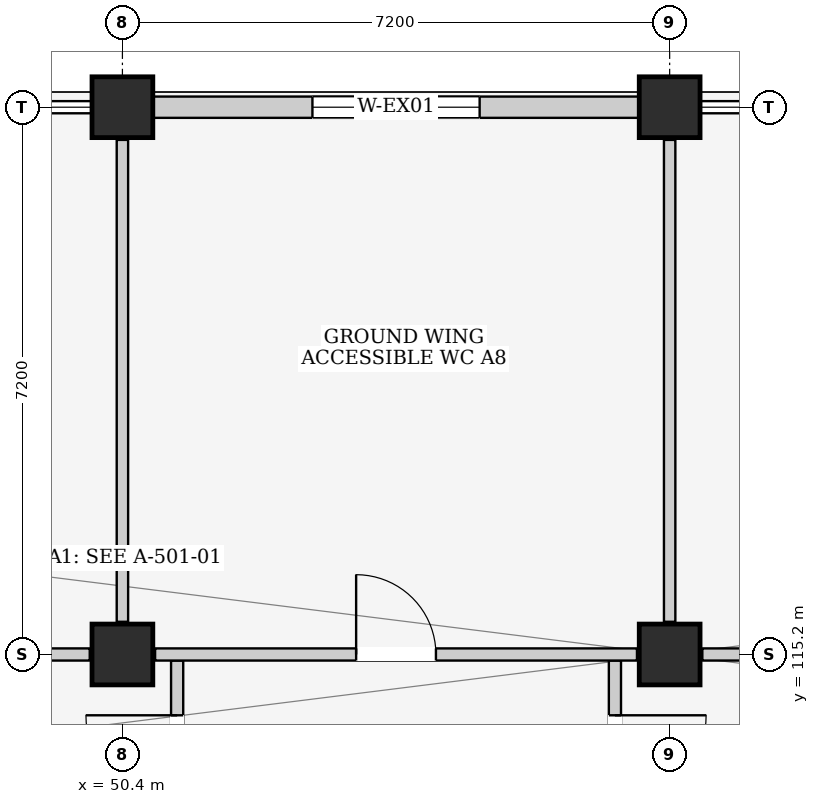
"""IFC4 building model, lengths in metres.
Left out: names, types, materials, properties, quantities, classifications, styles, units other than length and angle.
Written with IfcOpenShell. Run it as: python <this file> out.ifc"""

import sys

from ifc_helpers import new_model, si_unit, direction, frame, frame_2d, origin, origin_2d, place, context, subcontext, project, spatial, rectangle, extrude, element, fill, save


model = new_model("IFC4")
c1 = context("Model", 3, precision=1e-05, world=origin(), true_north=direction((0.0, 1.0)))
c2 = subcontext(c1, "Body", "Model", "MODEL_VIEW")
j1 = project(units=[si_unit("LENGTHUNIT", "METRE"), si_unit("PLANEANGLEUNIT", "RADIAN")], contexts=[c1])
p1 = place(None, origin())
s1 = spatial("IfcSite", under=j1, at=p1, CompositionType="ELEMENT")
p2 = place(p1, origin())
s2 = spatial("IfcBuilding", under=s1, at=p2, CompositionType="ELEMENT")
p3 = place(p2, origin())
s3 = spatial("IfcBuildingStorey", under=s2, at=p3, CompositionType="ELEMENT", Elevation=0.0)
for number, where, z_axis, x_axis in (
    (1, (50.4, 115.2, 0.0), (0.0, 0.0, 1.0), (1.0, 0.0, 0.0)),
    (2, (50.4, 122.4, 0.0), (0.0, 0.0, 1.0), (1.0, 0.0, 0.0)),
    (3, (57.6, 115.2, 0.0), (0.0, 0.0, 1.0), (1.0, 0.0, 0.0)),
    (4, (57.6, 122.4, 0.0), (0.0, 0.0, 1.0), (1.0, 0.0, 0.0)),
):
    element("IfcColumn", number, at=place(p3, frame(where, z_axis=z_axis, x_axis=x_axis)), inside=s3, PredefinedType="COLUMN", context=c2, shape_type="SweptSolid", body=[
        extrude(rectangle(XDim=0.8, YDim=0.8, at=origin_2d()), origin(), (0.0, 0.0, 1.0), 4.5),
    ])
p4 = place(p3, frame((50.8, 122.4, 0.0), z_axis=(0.0, 0.0, 1.0), x_axis=(1.0, 0.0, 0.0)))
e5 = element("IfcWall", 5, at=p4, inside=s3, PredefinedType="ELEMENTEDWALL", context=c2, shape_type="SweptSolid", body=[
    extrude(rectangle(XDim=6.4, YDim=0.28, at=frame_2d((3.2, 0.0))), origin(), (0.0, 0.0, 1.0), 3.665),
])
p5 = place(p4, frame((2.1, 0.0, 0.85)))
e6 = element("IfcOpeningElement", 6, at=p5, cuts=e5, PredefinedType="OPENING", context=c2, shape_type="SweptSolid", body=[
    extrude(rectangle(XDim=2.2, YDim=1.8, at=frame_2d((1.1, 0.9))), frame((0.0, 0.155, 0.0), z_axis=(0.0, -1.0, 0.0), x_axis=(1.0, 0.0, 0.0)), (0.0, 0.0, 1.0), 0.31),
])
p6 = place(p3, frame((51.12, 111.1, 0.0), z_axis=(0.0, 0.0, 1.0), x_axis=(0.0, 1.0, 0.0)))
e7 = element("IfcWall", 7, at=p6, inside=s3, PredefinedType="PARTITIONING", context=c2, shape_type="SweptSolid", body=[
    extrude(rectangle(XDim=4.02, YDim=0.16, at=frame_2d((2.01, 0.0))), origin(), (0.0, 0.0, 1.0), 4.2),
])
p7 = place(p6, frame((2.1, 0.0, 0.0)))
e8 = element("IfcOpeningElement", 8, at=p7, cuts=e7, PredefinedType="OPENING", context=c2, shape_type="SweptSolid", body=[
    extrude(rectangle(XDim=1.2, YDim=2.2, at=frame_2d((0.6, 1.1))), frame((0.0, 0.095, 0.0), z_axis=(0.0, -1.0, 0.0), x_axis=(1.0, 0.0, 0.0)), (0.0, 0.0, 1.0), 0.19),
])
p8 = place(p3, frame((56.88, 111.1, 0.0), z_axis=(0.0, 0.0, 1.0), x_axis=(0.0, 1.0, 0.0)))
e9 = element("IfcWall", 9, at=p8, inside=s3, PredefinedType="PARTITIONING", context=c2, shape_type="SweptSolid", body=[
    extrude(rectangle(XDim=4.02, YDim=0.16, at=frame_2d((2.01, 0.0))), origin(), (0.0, 0.0, 1.0), 4.2),
])
p9 = place(p8, frame((2.1, 0.0, 0.0)))
e10 = element("IfcOpeningElement", 10, at=p9, cuts=e9, PredefinedType="OPENING", context=c2, shape_type="SweptSolid", body=[
    extrude(rectangle(XDim=1.2, YDim=2.2, at=frame_2d((0.6, 1.1))), frame((0.0, 0.095, 0.0), z_axis=(0.0, -1.0, 0.0), x_axis=(1.0, 0.0, 0.0)), (0.0, 0.0, 1.0), 0.19),
])
p10 = place(p3, frame((43.63, 115.2, 0.0), z_axis=(0.0, 0.0, 1.0), x_axis=(1.0, 0.0, 0.0)))
e11 = element("IfcWall", 11, at=p10, inside=s3, PredefinedType="PARTITIONING", context=c2, shape_type="SweptSolid", body=[
    extrude(rectangle(XDim=6.34, YDim=0.16, at=frame_2d((3.17, 0.0))), origin(), (0.0, 0.0, 1.0), 3.435),
])
p11 = place(p10, frame((2.645, 0.0, 0.0)))
e12 = element("IfcOpeningElement", 12, at=p11, cuts=e11, PredefinedType="OPENING", context=c2, shape_type="SweptSolid", body=[
    extrude(rectangle(XDim=1.05, YDim=2.15, at=frame_2d((0.525, 1.075))), frame((0.0, 0.095, 0.0), z_axis=(0.0, -1.0, 0.0), x_axis=(1.0, 0.0, 0.0)), (0.0, 0.0, 1.0), 0.19),
])
p12 = place(p3, frame((50.4, 115.63, 0.0), z_axis=(0.0, 0.0, 1.0), x_axis=(0.0, 1.0, 0.0)))
e13 = element("IfcWall", 13, at=p12, inside=s3, PredefinedType="PARTITIONING", context=c2, shape_type="SweptSolid", body=[
    extrude(rectangle(XDim=6.34, YDim=0.15, at=frame_2d((3.17, 0.0))), origin(), (0.0, 0.0, 1.0), 3.435),
])
p13 = place(p3, frame((50.83, 115.2, 0.0), z_axis=(0.0, 0.0, 1.0), x_axis=(1.0, 0.0, 0.0)))
e14 = element("IfcWall", 14, at=p13, inside=s3, PredefinedType="PARTITIONING", context=c2, shape_type="SweptSolid", body=[
    extrude(rectangle(XDim=6.34, YDim=0.16, at=frame_2d((3.17, 0.0))), origin(), (0.0, 0.0, 1.0), 3.435),
])
p14 = place(p13, frame((2.645, 0.0, 0.0)))
e15 = element("IfcOpeningElement", 15, at=p14, cuts=e14, PredefinedType="OPENING", context=c2, shape_type="SweptSolid", body=[
    extrude(rectangle(XDim=1.05, YDim=2.15, at=frame_2d((0.525, 1.075))), frame((0.0, 0.095, 0.0), z_axis=(0.0, -1.0, 0.0), x_axis=(1.0, 0.0, 0.0)), (0.0, 0.0, 1.0), 0.19),
])
p15 = place(p3, frame((57.6, 115.63, 0.0), z_axis=(0.0, 0.0, 1.0), x_axis=(0.0, 1.0, 0.0)))
e16 = element("IfcWall", 16, at=p15, inside=s3, PredefinedType="PARTITIONING", context=c2, shape_type="SweptSolid", body=[
    extrude(rectangle(XDim=6.34, YDim=0.15, at=frame_2d((3.17, 0.0))), origin(), (0.0, 0.0, 1.0), 3.435),
])
p16 = place(p3, frame((58.03, 115.2, 0.0), z_axis=(0.0, 0.0, 1.0), x_axis=(1.0, 0.0, 0.0)))
e17 = element("IfcWall", 17, at=p16, inside=s3, PredefinedType="PARTITIONING", context=c2, shape_type="SweptSolid", body=[
    extrude(rectangle(XDim=6.34, YDim=0.16, at=frame_2d((3.17, 0.0))), origin(), (0.0, 0.0, 1.0), 3.435),
])
p17 = place(p16, frame((2.61, 0.0, 0.0)))
e18 = element("IfcOpeningElement", 18, at=p17, cuts=e17, PredefinedType="OPENING", context=c2, shape_type="SweptSolid", body=[
    extrude(rectangle(XDim=1.12, YDim=2.2, at=frame_2d((0.56, 1.1))), frame((0.0, 0.095, 0.0), z_axis=(0.0, -1.0, 0.0), x_axis=(1.0, 0.0, 0.0)), (0.0, 0.0, 1.0), 0.19),
])
p18 = place(p5, origin())
e19 = element("IfcWindow", 19, at=p18, inside=s3, PartitioningType="TRIPLE_PANEL_VERTICAL", PredefinedType="WINDOW", context=c2, shape_type="SweptSolid", body=[
    extrude(rectangle(XDim=2.2, YDim=1.8, at=frame_2d((1.1, 0.9))), frame((0.0, 0.03, 0.0), z_axis=(0.0, -1.0, 0.0), x_axis=(1.0, 0.0, 0.0)), (0.0, 0.0, 1.0), 0.06),
])
fill(e6, e19)
p19 = place(p7, origin())
e20 = element("IfcDoor", 20, at=p19, inside=s3, OperationType="SINGLE_SWING_RIGHT", PredefinedType="DOOR", context=c2, shape_type="SweptSolid", body=[
    extrude(rectangle(XDim=1.2, YDim=2.2, at=frame_2d((0.6, 1.1))), frame((0.0, 0.025, 0.0), z_axis=(0.0, -1.0, 0.0), x_axis=(1.0, 0.0, 0.0)), (0.0, 0.0, 1.0), 0.05),
])
fill(e8, e20)
p20 = place(p9, frame((1.2, 0.0, 0.0), z_axis=(0.0, 0.0, 1.0), x_axis=(-1.0, 0.0, 0.0)))
e21 = element("IfcDoor", 21, at=p20, inside=s3, OperationType="SINGLE_SWING_LEFT", PredefinedType="DOOR", context=c2, shape_type="SweptSolid", body=[
    extrude(rectangle(XDim=1.2, YDim=2.2, at=frame_2d((0.6, 1.1))), frame((0.0, 0.025, 0.0), z_axis=(0.0, -1.0, 0.0), x_axis=(1.0, 0.0, 0.0)), (0.0, 0.0, 1.0), 0.05),
])
fill(e10, e21)
p21 = place(p14, origin())
e22 = element("IfcDoor", 22, at=p21, inside=s3, OperationType="SINGLE_SWING_LEFT", PredefinedType="DOOR", context=c2, shape_type="SweptSolid", body=[
    extrude(rectangle(XDim=1.05, YDim=2.15, at=frame_2d((0.525, 1.075))), frame((0.0, 0.025, 0.0), z_axis=(0.0, -1.0, 0.0), x_axis=(1.0, 0.0, 0.0)), (0.0, 0.0, 1.0), 0.05),
])
fill(e15, e22)
save(model, sys.argv[1])
